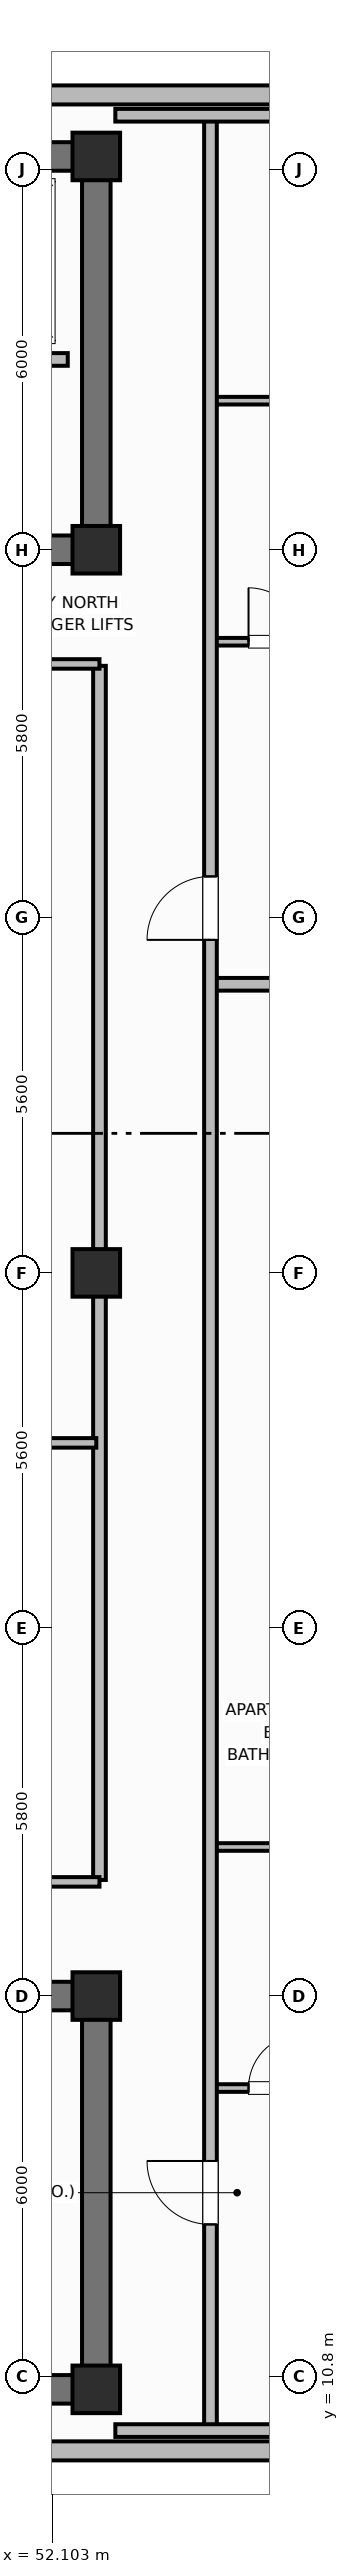
"""IFC4 building model, lengths in metres.
Left out: names, types, materials, properties, quantities, classifications, styles, units other than length and angle.
Written with IfcOpenShell. Run it as: python <this file> out.ifc"""

import sys

from ifc_helpers import new_model, si_unit, direction, frame, frame_2d, origin, origin_2d, place, context, subcontext, project, spatial, rectangle, extrude, element, fill, save


model = new_model("IFC4")
c1 = context("Model", 3, precision=1e-05, world=origin(), true_north=direction((0.0, 1.0)))
c2 = subcontext(c1, "Body", "Model", "MODEL_VIEW")
j1 = project(units=[si_unit("LENGTHUNIT", "METRE"), si_unit("PLANEANGLEUNIT", "RADIAN")], contexts=[c1])
p1 = place(None, origin())
s1 = spatial("IfcSite", under=j1, at=p1, CompositionType="ELEMENT")
p2 = place(p1, origin())
s2 = spatial("IfcBuilding", under=s1, at=p2, CompositionType="ELEMENT")
p3 = place(p2, frame((0.0, 0.0, 286.1)))
s3 = spatial("IfcBuildingStorey", under=s2, at=p3, CompositionType="ELEMENT", Elevation=286.1)
p4 = place(p3, frame((52.8, 10.6, 0.0), z_axis=(0.0, 0.0, 1.0), x_axis=(-1.0, 0.0, 0.0)))
e1 = element("IfcWall", 1, at=p4, inside=s3, PredefinedType="SHEAR", context=c2, shape_type="SweptSolid", body=[
    extrude(rectangle(XDim=27.2, YDim=0.45, at=frame_2d((13.6, 0.0))), origin(), (0.0, 0.0, 1.0), 3.7),
])
p5 = place(p3, frame((52.8, 10.825, 0.0), z_axis=(0.0, 0.0, 1.0), x_axis=(0.0, 1.0, 0.0)))
e2 = element("IfcWall", 2, at=p5, inside=s3, PredefinedType="SHEAR", context=c2, shape_type="SweptSolid", body=[
    extrude(rectangle(XDim=5.75, YDim=0.45, at=frame_2d((2.875, 0.0))), origin(), (0.0, 0.0, 1.0), 3.7),
])
p6 = place(p3, frame((25.6, 16.8, 0.0), z_axis=(0.0, 0.0, 1.0), x_axis=(1.0, 0.0, 0.0)))
e3 = element("IfcWall", 3, at=p6, inside=s3, PredefinedType="SHEAR", context=c2, shape_type="SweptSolid", body=[
    extrude(rectangle(XDim=27.2, YDim=0.45, at=frame_2d((13.6, 0.0))), origin(), (0.0, 0.0, 1.0), 3.7),
])
p7 = place(p6, frame((1.9, 0.0, 0.0)))
e4 = element("IfcOpeningElement", 4, at=p7, cuts=e3, PredefinedType="OPENING", context=c2, shape_type="SweptSolid", body=[
    extrude(rectangle(XDim=1.1, YDim=2.15, at=frame_2d((0.55, 1.075))), frame((0.0, 0.235, 0.0), z_axis=(0.0, -1.0, 0.0), x_axis=(1.0, 0.0, 0.0)), (0.0, 0.0, 1.0), 0.47),
])
p8 = place(p6, frame((13.0, 0.0, 0.0)))
e5 = element("IfcOpeningElement", 5, at=p8, cuts=e3, PredefinedType="OPENING", context=c2, shape_type="SweptSolid", body=[
    extrude(rectangle(XDim=1.2, YDim=2.15, at=frame_2d((0.6, 1.075))), frame((0.0, 0.235, 0.0), z_axis=(0.0, -1.0, 0.0), x_axis=(1.0, 0.0, 0.0)), (0.0, 0.0, 1.0), 0.47),
])
p9 = place(p6, frame((21.6, 0.0, 0.0)))
e6 = element("IfcOpeningElement", 6, at=p9, cuts=e3, PredefinedType="OPENING", context=c2, shape_type="SweptSolid", body=[
    extrude(rectangle(XDim=1.0, YDim=2.15, at=frame_2d((0.5, 1.075))), frame((0.0, 0.235, 0.0), z_axis=(0.0, -1.0, 0.0), x_axis=(1.0, 0.0, 0.0)), (0.0, 0.0, 1.0), 0.47),
])
p10 = place(p3, frame((25.6, 45.8, 0.0), z_axis=(0.0, 0.0, 1.0), x_axis=(1.0, 0.0, 0.0)))
e7 = element("IfcWall", 7, at=p10, inside=s3, PredefinedType="SHEAR", context=c2, shape_type="SweptSolid", body=[
    extrude(rectangle(XDim=27.2, YDim=0.45, at=frame_2d((13.6, 0.0))), origin(), (0.0, 0.0, 1.0), 3.7),
])
p11 = place(p3, frame((52.8, 39.825, 0.0), z_axis=(0.0, 0.0, 1.0), x_axis=(0.0, 1.0, 0.0)))
e8 = element("IfcWall", 8, at=p11, inside=s3, PredefinedType="SHEAR", context=c2, shape_type="SweptSolid", body=[
    extrude(rectangle(XDim=5.75, YDim=0.45, at=frame_2d((2.875, 0.0))), origin(), (0.0, 0.0, 1.0), 3.7),
])
p12 = place(p3, frame((52.8, 39.6, 0.0), z_axis=(0.0, 0.0, 1.0), x_axis=(-1.0, 0.0, 0.0)))
e9 = element("IfcWall", 9, at=p12, inside=s3, PredefinedType="SHEAR", context=c2, shape_type="SweptSolid", body=[
    extrude(rectangle(XDim=27.2, YDim=0.45, at=frame_2d((13.6, 0.0))), origin(), (0.0, 0.0, 1.0), 3.7),
])
p13 = place(p12, frame((24.2, 0.0, 0.0)))
e10 = element("IfcOpeningElement", 10, at=p13, cuts=e9, PredefinedType="OPENING", context=c2, shape_type="SweptSolid", body=[
    extrude(rectangle(XDim=1.1, YDim=2.15, at=frame_2d((0.55, 1.075))), frame((0.0, 0.235, 0.0), z_axis=(0.0, -1.0, 0.0), x_axis=(1.0, 0.0, 0.0)), (0.0, 0.0, 1.0), 0.47),
])
p14 = place(p12, frame((15.1, 0.0, 0.0)))
e11 = element("IfcOpeningElement", 11, at=p14, cuts=e9, PredefinedType="OPENING", context=c2, shape_type="SweptSolid", body=[
    extrude(rectangle(XDim=1.2, YDim=2.15, at=frame_2d((0.6, 1.075))), frame((0.0, 0.235, 0.0), z_axis=(0.0, -1.0, 0.0), x_axis=(1.0, 0.0, 0.0)), (0.0, 0.0, 1.0), 0.47),
])
p15 = place(p12, frame((11.6, 0.0, 0.0)))
e12 = element("IfcOpeningElement", 12, at=p15, cuts=e9, PredefinedType="OPENING", context=c2, shape_type="SweptSolid", body=[
    extrude(rectangle(XDim=0.9, YDim=2.1, at=frame_2d((0.45, 1.05))), frame((0.0, 0.235, 0.0), z_axis=(0.0, -1.0, 0.0), x_axis=(1.0, 0.0, 0.0)), (0.0, 0.0, 1.0), 0.47),
])
p16 = place(p12, frame((7.35, 0.0, 0.0)))
e13 = element("IfcOpeningElement", 13, at=p16, cuts=e9, PredefinedType="OPENING", context=c2, shape_type="SweptSolid", body=[
    extrude(rectangle(XDim=0.85, YDim=2.1, at=frame_2d((0.425, 1.05))), frame((0.0, 0.235, 0.0), z_axis=(0.0, -1.0, 0.0), x_axis=(1.0, 0.0, 0.0)), (0.0, 0.0, 1.0), 0.47),
])
p17 = place(p12, frame((4.2, 0.0, 0.0)))
e14 = element("IfcOpeningElement", 14, at=p17, cuts=e9, PredefinedType="OPENING", context=c2, shape_type="SweptSolid", body=[
    extrude(rectangle(XDim=1.3, YDim=2.2, at=frame_2d((0.65, 1.1))), frame((0.0, 0.235, 0.0), z_axis=(0.0, -1.0, 0.0), x_axis=(1.0, 0.0, 0.0)), (0.0, 0.0, 1.0), 0.47),
])
for number, where, z_axis, x_axis in (
    (15, (52.8, 10.6, 0.0), (0.0, 0.0, 1.0), (1.0, 0.0, 0.0)),
    (16, (52.8, 16.8, 0.0), (0.0, 0.0, 1.0), (1.0, 0.0, 0.0)),
    (17, (52.8, 39.6, 0.0), (0.0, 0.0, 1.0), (1.0, 0.0, 0.0)),
    (18, (52.8, 45.8, 0.0), (0.0, 0.0, 1.0), (1.0, 0.0, 0.0)),
    (19, (52.8, 28.2, 0.0), (0.0, 0.0, 1.0), (1.0, 0.0, 0.0)),
):
    element("IfcColumn", number, at=place(p3, frame(where, z_axis=z_axis, x_axis=x_axis)), inside=s3, PredefinedType="COLUMN", context=c2, shape_type="SweptSolid", body=[
        extrude(rectangle(XDim=0.75, YDim=0.75, at=origin_2d()), origin(), (0.0, 0.0, 1.0), 3.7),
    ])
p18 = place(p3, frame((22.56, 9.63, 0.0), z_axis=(0.0, 0.0, 1.0), x_axis=(1.0, 0.0, 0.0)))
e20 = element("IfcWall", 20, at=p18, inside=s3, PredefinedType="SOLIDWALL", context=c2, shape_type="SweptSolid", body=[
    extrude(rectangle(XDim=33.28, YDim=0.3, at=frame_2d((16.64, 0.0))), origin(), (0.0, 0.0, 1.0), 2.73),
])
p19 = place(p18, frame((4.747, 0.0, 0.76)))
e21 = element("IfcOpeningElement", 21, at=p19, cuts=e20, PredefinedType="OPENING", context=c2, shape_type="SweptSolid", body=[
    extrude(rectangle(XDim=1.4, YDim=1.85, at=frame_2d((0.7, 0.925))), frame((0.0, 0.16, 0.0), z_axis=(0.0, -1.0, 0.0), x_axis=(1.0, 0.0, 0.0)), (0.0, 0.0, 1.0), 0.32),
])
p20 = place(p18, frame((7.945, 0.0, 0.76)))
e22 = element("IfcOpeningElement", 22, at=p20, cuts=e20, PredefinedType="OPENING", context=c2, shape_type="SweptSolid", body=[
    extrude(rectangle(XDim=1.4, YDim=1.85, at=frame_2d((0.7, 0.925))), frame((0.0, 0.16, 0.0), z_axis=(0.0, -1.0, 0.0), x_axis=(1.0, 0.0, 0.0)), (0.0, 0.0, 1.0), 0.32),
])
p21 = place(p18, frame((14.341, 0.0, 0.76)))
e23 = element("IfcOpeningElement", 23, at=p21, cuts=e20, PredefinedType="OPENING", context=c2, shape_type="SweptSolid", body=[
    extrude(rectangle(XDim=1.4, YDim=1.85, at=frame_2d((0.7, 0.925))), frame((0.0, 0.16, 0.0), z_axis=(0.0, -1.0, 0.0), x_axis=(1.0, 0.0, 0.0)), (0.0, 0.0, 1.0), 0.32),
])
p22 = place(p18, frame((17.539, 0.0, 0.76)))
e24 = element("IfcOpeningElement", 24, at=p22, cuts=e20, PredefinedType="OPENING", context=c2, shape_type="SweptSolid", body=[
    extrude(rectangle(XDim=1.4, YDim=1.85, at=frame_2d((0.7, 0.925))), frame((0.0, 0.16, 0.0), z_axis=(0.0, -1.0, 0.0), x_axis=(1.0, 0.0, 0.0)), (0.0, 0.0, 1.0), 0.32),
])
p23 = place(p18, frame((23.935, 0.0, 0.76)))
e25 = element("IfcOpeningElement", 25, at=p23, cuts=e20, PredefinedType="OPENING", context=c2, shape_type="SweptSolid", body=[
    extrude(rectangle(XDim=1.4, YDim=1.85, at=frame_2d((0.7, 0.925))), frame((0.0, 0.16, 0.0), z_axis=(0.0, -1.0, 0.0), x_axis=(1.0, 0.0, 0.0)), (0.0, 0.0, 1.0), 0.32),
])
p24 = place(p18, frame((27.133, 0.0, 0.76)))
e26 = element("IfcOpeningElement", 26, at=p24, cuts=e20, PredefinedType="OPENING", context=c2, shape_type="SweptSolid", body=[
    extrude(rectangle(XDim=1.4, YDim=1.85, at=frame_2d((0.7, 0.925))), frame((0.0, 0.16, 0.0), z_axis=(0.0, -1.0, 0.0), x_axis=(1.0, 0.0, 0.0)), (0.0, 0.0, 1.0), 0.32),
])
p25 = place(p3, frame((55.84, 46.77, 0.0), z_axis=(0.0, 0.0, 1.0), x_axis=(-1.0, 0.0, 0.0)))
e27 = element("IfcWall", 27, at=p25, inside=s3, PredefinedType="SOLIDWALL", context=c2, shape_type="SweptSolid", body=[
    extrude(rectangle(XDim=33.28, YDim=0.3, at=frame_2d((16.64, 0.0))), origin(), (0.0, 0.0, 1.0), 2.73),
])
p26 = place(p25, frame((5.08, 0.0, 0.76)))
e28 = element("IfcOpeningElement", 28, at=p26, cuts=e27, PredefinedType="OPENING", context=c2, shape_type="SweptSolid", body=[
    extrude(rectangle(XDim=1.8, YDim=1.85, at=frame_2d((0.9, 0.925))), frame((0.0, 0.16, 0.0), z_axis=(0.0, -1.0, 0.0), x_axis=(1.0, 0.0, 0.0)), (0.0, 0.0, 1.0), 0.32),
])
p27 = place(p25, frame((8.633, 0.0, 0.76)))
e29 = element("IfcOpeningElement", 29, at=p27, cuts=e27, PredefinedType="OPENING", context=c2, shape_type="SweptSolid", body=[
    extrude(rectangle(XDim=1.8, YDim=1.85, at=frame_2d((0.9, 0.925))), frame((0.0, 0.16, 0.0), z_axis=(0.0, -1.0, 0.0), x_axis=(1.0, 0.0, 0.0)), (0.0, 0.0, 1.0), 0.32),
])
p28 = place(p25, frame((15.74, 0.0, 0.76)))
e30 = element("IfcOpeningElement", 30, at=p28, cuts=e27, PredefinedType="OPENING", context=c2, shape_type="SweptSolid", body=[
    extrude(rectangle(XDim=1.8, YDim=1.85, at=frame_2d((0.9, 0.925))), frame((0.0, 0.16, 0.0), z_axis=(0.0, -1.0, 0.0), x_axis=(1.0, 0.0, 0.0)), (0.0, 0.0, 1.0), 0.32),
])
p29 = place(p25, frame((22.847, 0.0, 0.76)))
e31 = element("IfcOpeningElement", 31, at=p29, cuts=e27, PredefinedType="OPENING", context=c2, shape_type="SweptSolid", body=[
    extrude(rectangle(XDim=1.8, YDim=1.85, at=frame_2d((0.9, 0.925))), frame((0.0, 0.16, 0.0), z_axis=(0.0, -1.0, 0.0), x_axis=(1.0, 0.0, 0.0)), (0.0, 0.0, 1.0), 0.32),
])
p30 = place(p25, frame((26.4, 0.0, 0.76)))
e32 = element("IfcOpeningElement", 32, at=p30, cuts=e27, PredefinedType="OPENING", context=c2, shape_type="SweptSolid", body=[
    extrude(rectangle(XDim=1.8, YDim=1.85, at=frame_2d((0.9, 0.925))), frame((0.0, 0.16, 0.0), z_axis=(0.0, -1.0, 0.0), x_axis=(1.0, 0.0, 0.0)), (0.0, 0.0, 1.0), 0.32),
])
p31 = place(p3, frame((52.35, 42.6, 0.0), z_axis=(0.0, 0.0, 1.0), x_axis=(-1.0, 0.0, 0.0)))
e33 = element("IfcWall", 33, at=p31, inside=s3, PredefinedType="PARTITIONING", context=c2, shape_type="SweptSolid", body=[
    extrude(rectangle(XDim=6.5, YDim=0.2, at=frame_2d((3.25, 0.0))), origin(), (0.0, 0.0, 1.0), 2.56),
])
p32 = place(p31, frame((4.9, 0.0, 0.0)))
e34 = element("IfcOpeningElement", 34, at=p32, cuts=e33, PredefinedType="OPENING", context=c2, shape_type="SweptSolid", body=[
    extrude(rectangle(XDim=1.0, YDim=2.15, at=frame_2d((0.5, 1.075))), frame((0.0, 0.11, 0.0), z_axis=(0.0, -1.0, 0.0), x_axis=(1.0, 0.0, 0.0)), (0.0, 0.0, 1.0), 0.22),
])
p33 = place(p31, frame((2.8, 0.0, 0.0)))
e35 = element("IfcOpeningElement", 35, at=p33, cuts=e33, PredefinedType="OPENING", context=c2, shape_type="SweptSolid", body=[
    extrude(rectangle(XDim=1.0, YDim=2.15, at=frame_2d((0.5, 1.075))), frame((0.0, 0.11, 0.0), z_axis=(0.0, -1.0, 0.0), x_axis=(1.0, 0.0, 0.0)), (0.0, 0.0, 1.0), 0.22),
])
p34 = place(p31, frame((0.7, 0.0, 0.0)))
e36 = element("IfcOpeningElement", 36, at=p34, cuts=e33, PredefinedType="OPENING", context=c2, shape_type="SweptSolid", body=[
    extrude(rectangle(XDim=1.0, YDim=2.15, at=frame_2d((0.5, 1.075))), frame((0.0, 0.11, 0.0), z_axis=(0.0, -1.0, 0.0), x_axis=(1.0, 0.0, 0.0)), (0.0, 0.0, 1.0), 0.22),
])
p35 = place(p3, frame((52.85, 18.63, 0.0), z_axis=(0.0, 0.0, 1.0), x_axis=(0.0, 1.0, 0.0)))
e37 = element("IfcWall", 37, at=p35, inside=s3, PredefinedType="PARTITIONING", context=c2, shape_type="SweptSolid", body=[
    extrude(rectangle(XDim=19.14, YDim=0.2, at=frame_2d((9.57, 0.0))), origin(), (0.0, 0.0, 1.0), 2.56),
])
for number, where, z_axis, x_axis in (
    (38, (29.9, 18.6, 0.0), (0.0, 0.0, 1.0), (1.0, 0.0, 0.0)),
    (39, (29.9, 37.8, 0.0), (0.0, 0.0, 1.0), (1.0, 0.0, 0.0)),
):
    element("IfcWall", number, at=place(p3, frame(where, z_axis=z_axis, x_axis=x_axis)), inside=s3, PredefinedType="PARTITIONING", context=c2, shape_type="SweptSolid", body=[
        extrude(rectangle(XDim=22.95, YDim=0.15, at=frame_2d((11.475, 0.0))), origin(), (0.0, 0.0, 1.0), 2.56),
    ])
p36 = place(p3, frame((29.93, 25.521, 0.0), z_axis=(0.0, 0.0, 1.0), x_axis=(1.0, 0.0, 0.0)))
e40 = element("IfcWall", 40, at=p36, inside=s3, PredefinedType="PARTITIONING", context=c2, shape_type="SweptSolid", body=[
    extrude(rectangle(XDim=22.87, YDim=0.15, at=frame_2d((11.435, 0.0))), origin(), (0.0, 0.0, 1.0), 2.56),
])
p37 = place(p3, frame((54.6, 15.35, 0.0), z_axis=(0.0, 0.0, 1.0), x_axis=(1.0, 0.0, 0.0)))
e41 = element("IfcWall", 41, at=p37, inside=s3, PredefinedType="PARTITIONING", context=c2, shape_type="SweptSolid", body=[
    extrude(rectangle(XDim=1.95, YDim=0.12, at=frame_2d((0.975, 0.0))), origin(), (0.0, 0.0, 1.0), 2.56),
])
p38 = place(p37, frame((0.6, 0.0, 0.0)))
e42 = element("IfcOpeningElement", 42, at=p38, cuts=e41, PredefinedType="OPENING", context=c2, shape_type="SweptSolid", body=[
    extrude(rectangle(XDim=0.85, YDim=2.1, at=frame_2d((0.425, 1.05))), frame((0.0, 0.07, 0.0), z_axis=(0.0, -1.0, 0.0), x_axis=(1.0, 0.0, 0.0)), (0.0, 0.0, 1.0), 0.14),
])
p39 = place(p3, frame((54.6, 19.15, 0.0), z_axis=(0.0, 0.0, 1.0), x_axis=(1.0, 0.0, 0.0)))
e43 = element("IfcWall", 43, at=p39, inside=s3, PredefinedType="PARTITIONING", context=c2, shape_type="SweptSolid", body=[
    extrude(rectangle(XDim=1.95, YDim=0.12, at=frame_2d((0.975, 0.0))), origin(), (0.0, 0.0, 1.0), 2.56),
])
p40 = place(p3, frame((54.6, 32.75, 0.0), z_axis=(0.0, 0.0, 1.0), x_axis=(1.0, 0.0, 0.0)))
e44 = element("IfcWall", 44, at=p40, inside=s3, PredefinedType="PARTITIONING", context=c2, shape_type="SweptSolid", body=[
    extrude(rectangle(XDim=4.27, YDim=0.2, at=frame_2d((2.135, 0.0))), origin(), (0.0, 0.0, 1.0), 2.56),
])
p41 = place(p3, frame((54.6, 38.15, 0.0), z_axis=(0.0, 0.0, 1.0), x_axis=(1.0, 0.0, 0.0)))
e45 = element("IfcWall", 45, at=p41, inside=s3, PredefinedType="PARTITIONING", context=c2, shape_type="SweptSolid", body=[
    extrude(rectangle(XDim=1.95, YDim=0.12, at=frame_2d((0.975, 0.0))), origin(), (0.0, 0.0, 1.0), 2.56),
])
p42 = place(p41, frame((0.6, 0.0, 0.0)))
e46 = element("IfcOpeningElement", 46, at=p42, cuts=e45, PredefinedType="OPENING", context=c2, shape_type="SweptSolid", body=[
    extrude(rectangle(XDim=0.85, YDim=2.1, at=frame_2d((0.425, 1.05))), frame((0.0, 0.07, 0.0), z_axis=(0.0, -1.0, 0.0), x_axis=(1.0, 0.0, 0.0)), (0.0, 0.0, 1.0), 0.14),
])
p43 = place(p3, frame((54.6, 41.95, 0.0), z_axis=(0.0, 0.0, 1.0), x_axis=(1.0, 0.0, 0.0)))
e47 = element("IfcWall", 47, at=p43, inside=s3, PredefinedType="PARTITIONING", context=c2, shape_type="SweptSolid", body=[
    extrude(rectangle(XDim=1.95, YDim=0.12, at=frame_2d((0.975, 0.0))), origin(), (0.0, 0.0, 1.0), 2.56),
])
p44 = place(p3, frame((54.6, 9.95, 0.0), z_axis=(0.0, 0.0, 1.0), x_axis=(0.0, 1.0, 0.0)))
e48 = element("IfcWall", 48, at=p44, inside=s3, PredefinedType="PARTITIONING", context=c2, shape_type="SweptSolid", body=[
    extrude(rectangle(XDim=36.5, YDim=0.2, at=frame_2d((18.25, 0.0))), origin(), (0.0, 0.0, 1.0), 2.56),
])
p45 = place(p44, frame((3.25, 0.0, 0.0)))
e49 = element("IfcOpeningElement", 49, at=p45, cuts=e48, PredefinedType="OPENING", context=c2, shape_type="SweptSolid", body=[
    extrude(rectangle(XDim=1.0, YDim=2.15, at=frame_2d((0.5, 1.075))), frame((0.0, 0.11, 0.0), z_axis=(0.0, -1.0, 0.0), x_axis=(1.0, 0.0, 0.0)), (0.0, 0.0, 1.0), 0.22),
])
p46 = place(p44, frame((23.5, 0.0, 0.0)))
e50 = element("IfcOpeningElement", 50, at=p46, cuts=e48, PredefinedType="OPENING", context=c2, shape_type="SweptSolid", body=[
    extrude(rectangle(XDim=1.0, YDim=2.15, at=frame_2d((0.5, 1.075))), frame((0.0, 0.11, 0.0), z_axis=(0.0, -1.0, 0.0), x_axis=(1.0, 0.0, 0.0)), (0.0, 0.0, 1.0), 0.22),
])
for number, where, z_axis, x_axis in (
    (51, (53.1, 9.95, 0.0), (0.0, 0.0, 1.0), (1.0, 0.0, 0.0)),
    (52, (53.1, 46.45, 0.0), (0.0, 0.0, 1.0), (1.0, 0.0, 0.0)),
):
    element("IfcWall", number, at=place(p3, frame(where, z_axis=z_axis, x_axis=x_axis)), inside=s3, PredefinedType="PARTITIONING", context=c2, shape_type="SweptSolid", body=[
        extrude(rectangle(XDim=3.754, YDim=0.2, at=frame_2d((1.877, 0.0))), origin(), (0.0, 0.0, 1.0), 2.56),
    ])
p47 = place(p38, origin())
e53 = element("IfcDoor", 53, at=p47, inside=s3, OperationType="SINGLE_SWING_RIGHT", PredefinedType="DOOR", context=c2, shape_type="SweptSolid", body=[
    extrude(rectangle(XDim=0.85, YDim=2.1, at=frame_2d((0.425, 1.05))), frame((0.0, 0.025, 0.0), z_axis=(0.0, -1.0, 0.0), x_axis=(1.0, 0.0, 0.0)), (0.0, 0.0, 1.0), 0.05),
])
fill(e42, e53)
p48 = place(p42, origin())
e54 = element("IfcDoor", 54, at=p48, inside=s3, OperationType="SINGLE_SWING_LEFT", PredefinedType="DOOR", context=c2, shape_type="SweptSolid", body=[
    extrude(rectangle(XDim=0.85, YDim=2.1, at=frame_2d((0.425, 1.05))), frame((0.0, 0.025, 0.0), z_axis=(0.0, -1.0, 0.0), x_axis=(1.0, 0.0, 0.0)), (0.0, 0.0, 1.0), 0.05),
])
fill(e46, e54)
p49 = place(p45, origin())
e55 = element("IfcDoor", 55, at=p49, inside=s3, OperationType="SINGLE_SWING_RIGHT", PredefinedType="DOOR", context=c2, shape_type="SweptSolid", body=[
    extrude(rectangle(XDim=1.0, YDim=2.15, at=frame_2d((0.5, 1.075))), frame((0.0, 0.025, 0.0), z_axis=(0.0, -1.0, 0.0), x_axis=(1.0, 0.0, 0.0)), (0.0, 0.0, 1.0), 0.05),
])
fill(e49, e55)
p50 = place(p46, origin())
e56 = element("IfcDoor", 56, at=p50, inside=s3, OperationType="SINGLE_SWING_LEFT", PredefinedType="DOOR", context=c2, shape_type="SweptSolid", body=[
    extrude(rectangle(XDim=1.0, YDim=2.15, at=frame_2d((0.5, 1.075))), frame((0.0, 0.025, 0.0), z_axis=(0.0, -1.0, 0.0), x_axis=(1.0, 0.0, 0.0)), (0.0, 0.0, 1.0), 0.05),
])
fill(e50, e56)
save(model, sys.argv[1])
